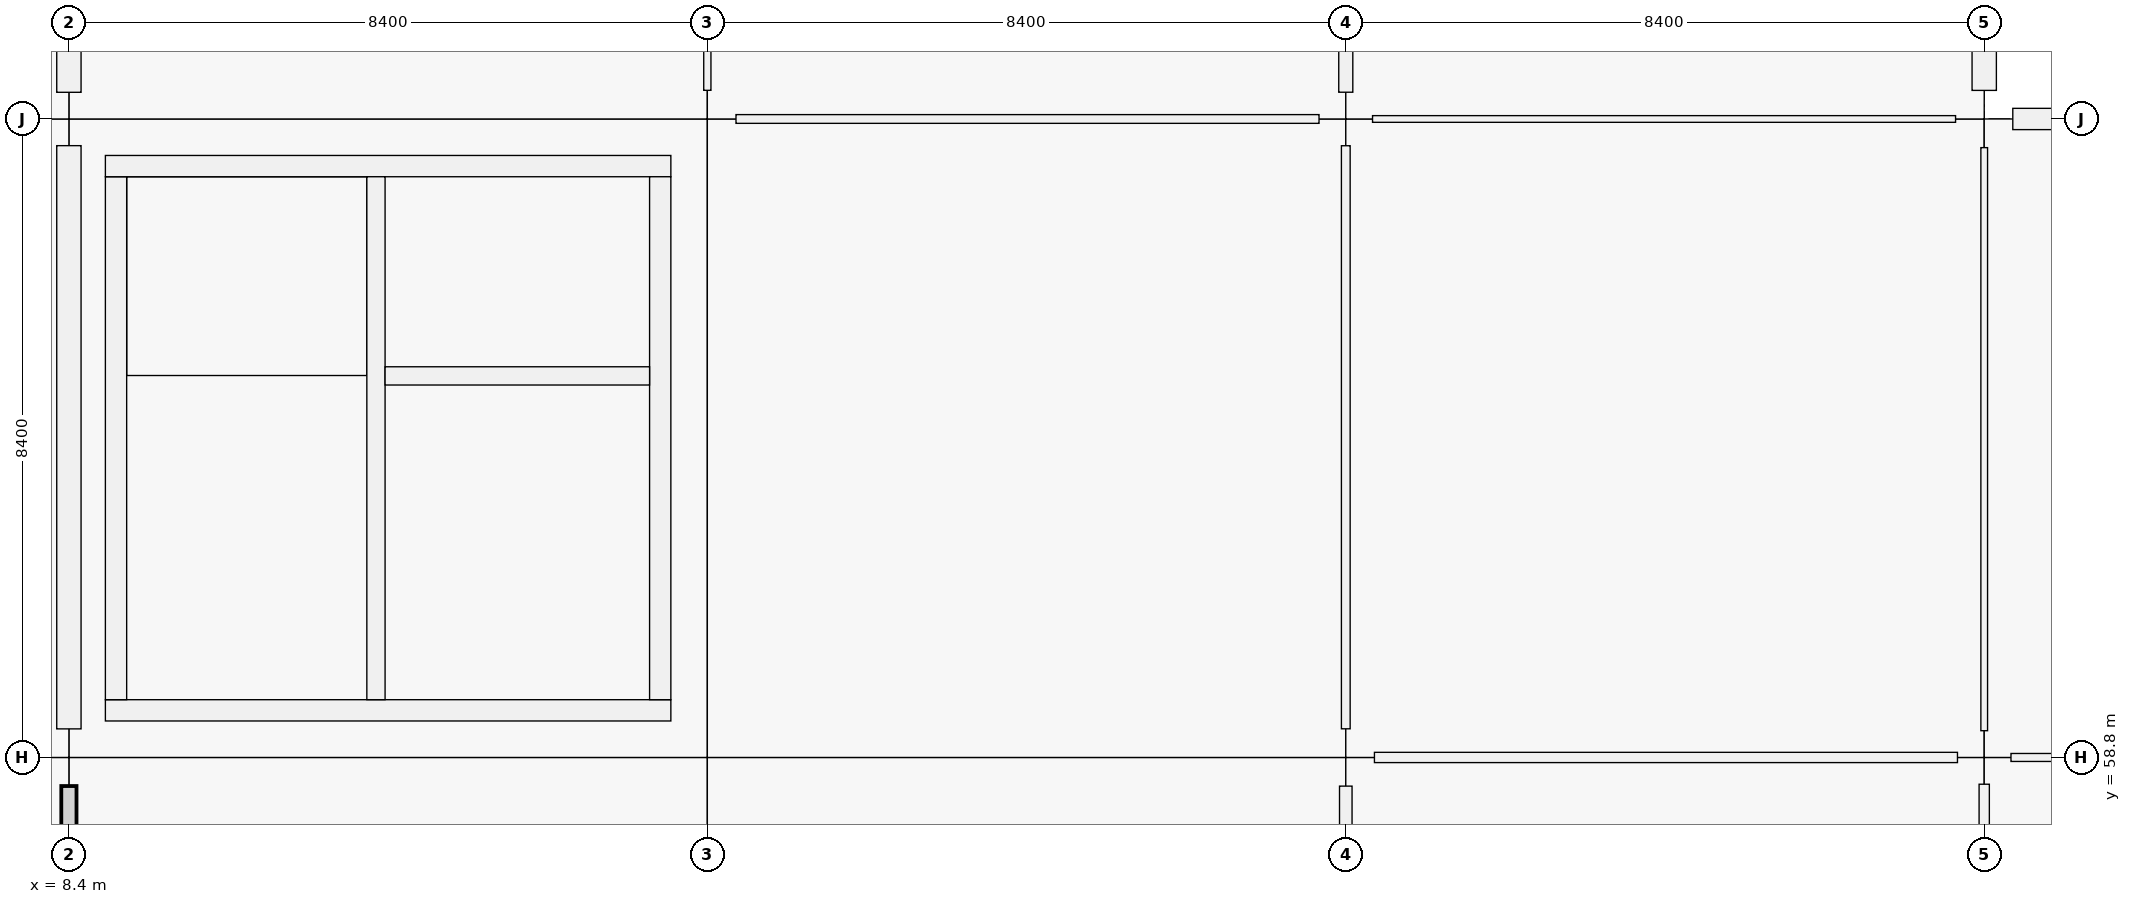
"""IFC4 building model, lengths in metres.
Left out: names, types, materials, properties, quantities, classifications, styles, units other than length and angle.
Written with IfcOpenShell. Run it as: python <this file> out.ifc"""

import sys

from ifc_helpers import new_model, si_unit, direction, frame, frame_2d, origin, origin_2d, place, context, subcontext, project, spatial, rectangle, extrude, element, fill, save


model = new_model("IFC4")
c1 = context("Model", 3, precision=1e-05, world=origin(), true_north=direction((0.0, 1.0)))
c2 = subcontext(c1, "Body", "Model", "MODEL_VIEW")
j1 = project(units=[si_unit("LENGTHUNIT", "METRE"), si_unit("PLANEANGLEUNIT", "RADIAN")], contexts=[c1])
p1 = place(None, origin())
s1 = spatial("IfcSite", under=j1, at=p1, CompositionType="ELEMENT")
p2 = place(p1, origin())
s2 = spatial("IfcBuilding", under=s1, at=p2, CompositionType="ELEMENT")
p3 = place(p2, frame((0.0, 0.0, 10.26)))
s3 = spatial("IfcBuildingStorey", under=s2, at=p3, CompositionType="ELEMENT", Elevation=10.26)
p4 = place(p3, frame((8.4, 58.8, 0.0), z_axis=(0.0, 0.0, 1.0), x_axis=(1.0, 0.0, 0.0)))
e1 = element("IfcColumn", 1, at=p4, inside=s3, PredefinedType="COLUMN", context=c2, shape_type="SweptSolid", body=[
    extrude(rectangle(XDim=0.75, YDim=0.75, at=origin_2d()), origin(), (0.0, 0.0, 1.0), 4.5),
])
for number, where, z_axis, x_axis in (
    (2, (8.4, 67.2, 0.0), (0.0, 0.0, 1.0), (1.0, 0.0, 0.0)),
    (3, (16.8, 58.8, 0.0), (0.0, 0.0, 1.0), (1.0, 0.0, 0.0)),
):
    element("IfcColumn", number, at=place(p3, frame(where, z_axis=z_axis, x_axis=x_axis)), inside=s3, PredefinedType="COLUMN", context=c2, shape_type="SweptSolid", body=[
        extrude(rectangle(XDim=0.7, YDim=0.7, at=origin_2d()), origin(), (0.0, 0.0, 1.0), 4.5),
    ])
for number, where, z_axis, x_axis in (
    (4, (16.8, 67.2, 0.0), (0.0, 0.0, 1.0), (1.0, 0.0, 0.0)),
    (5, (25.2, 58.8, 0.0), (0.0, 0.0, 1.0), (1.0, 0.0, 0.0)),
):
    element("IfcColumn", number, at=place(p3, frame(where, z_axis=z_axis, x_axis=x_axis)), inside=s3, PredefinedType="COLUMN", context=c2, shape_type="SweptSolid", body=[
        extrude(rectangle(XDim=0.75, YDim=0.75, at=origin_2d()), origin(), (0.0, 0.0, 1.0), 4.5),
    ])
for number, where, z_axis, x_axis in (
    (6, (25.2, 67.2, 0.0), (0.0, 0.0, 1.0), (1.0, 0.0, 0.0)),
    (7, (33.6, 58.8, 0.0), (0.0, 0.0, 1.0), (1.0, 0.0, 0.0)),
):
    element("IfcColumn", number, at=place(p3, frame(where, z_axis=z_axis, x_axis=x_axis)), inside=s3, PredefinedType="COLUMN", context=c2, shape_type="SweptSolid", body=[
        extrude(rectangle(XDim=0.7, YDim=0.7, at=origin_2d()), origin(), (0.0, 0.0, 1.0), 4.5),
    ])
p5 = place(p3, frame((33.6, 67.2, 0.0), z_axis=(0.0, 0.0, 1.0), x_axis=(1.0, 0.0, 0.0)))
e8 = element("IfcColumn", 8, at=p5, inside=s3, PredefinedType="COLUMN", context=c2, shape_type="SweptSolid", body=[
    extrude(rectangle(XDim=0.75, YDim=0.75, at=origin_2d()), origin(), (0.0, 0.0, 1.0), 4.5),
])
p6 = place(p3, frame((8.4, 59.176, 0.0), z_axis=(0.0, 0.0, 1.0), x_axis=(0.0, 1.0, 0.0)))
e9 = element("IfcWall", 9, at=p6, inside=s3, PredefinedType="SOLIDWALL", context=c2, shape_type="SweptSolid", body=[
    extrude(rectangle(XDim=7.673, YDim=0.32, at=frame_2d((3.836, 0.0))), origin(), (0.0, 0.0, 1.0), 3.54),
])
p7 = place(p3, frame((8.4, 67.551, 0.0), z_axis=(0.0, 0.0, 1.0), x_axis=(0.0, 1.0, 0.0)))
e10 = element("IfcWall", 10, at=p7, inside=s3, PredefinedType="SOLIDWALL", context=c2, shape_type="SweptSolid", body=[
    extrude(rectangle(XDim=7.673, YDim=0.32, at=frame_2d((3.836, 0.0))), origin(), (0.0, 0.0, 1.0), 3.54),
])
p8 = place(p7, frame((2.787, 0.0, 0.9)))
e11 = element("IfcOpeningElement", 11, at=p8, cuts=e10, PredefinedType="OPENING", context=c2, shape_type="SweptSolid", body=[
    extrude(rectangle(XDim=2.1, YDim=1.8, at=frame_2d((1.05, 0.9))), frame((0.0, 0.16, 0.0), z_axis=(0.0, -1.0, 0.0), x_axis=(1.0, 0.0, 0.0)), (0.0, 0.0, 1.0), 0.32),
])
p9 = place(p3, frame((33.6, 75.249, 0.0), z_axis=(0.0, 0.0, 1.0), x_axis=(0.0, -1.0, 0.0)))
e12 = element("IfcWall", 12, at=p9, inside=s3, PredefinedType="SOLIDWALL", context=c2, shape_type="SweptSolid", body=[
    extrude(rectangle(XDim=7.673, YDim=0.32, at=frame_2d((3.836, 0.0))), origin(), (0.0, 0.0, 1.0), 3.54),
])
p10 = place(p9, frame((2.486, 0.0, 0.9)))
e13 = element("IfcOpeningElement", 13, at=p10, cuts=e12, PredefinedType="OPENING", context=c2, shape_type="SweptSolid", body=[
    extrude(rectangle(XDim=2.7, YDim=1.2, at=frame_2d((1.35, 0.6))), frame((0.0, 0.16, 0.0), z_axis=(0.0, -1.0, 0.0), x_axis=(1.0, 0.0, 0.0)), (0.0, 0.0, 1.0), 0.32),
])
p11 = place(p3, frame((33.976, 67.2, 0.0), z_axis=(0.0, 0.0, 1.0), x_axis=(1.0, 0.0, 0.0)))
e14 = element("IfcWall", 14, at=p11, inside=s3, PredefinedType="SOLIDWALL", context=c2, shape_type="SweptSolid", body=[
    extrude(rectangle(XDim=7.673, YDim=0.28, at=frame_2d((3.836, 0.0))), origin(), (0.0, 0.0, 1.0), 3.54),
])
p12 = place(p11, frame((2.937, 0.0, 0.9)))
e15 = element("IfcOpeningElement", 15, at=p12, cuts=e14, PredefinedType="OPENING", context=c2, shape_type="SweptSolid", body=[
    extrude(rectangle(XDim=1.8, YDim=1.35, at=frame_2d((0.9, 0.675))), frame((0.0, 0.14, 0.0), z_axis=(0.0, -1.0, 0.0), x_axis=(1.0, 0.0, 0.0)), (0.0, 0.0, 1.0), 0.28),
])
p13 = place(p3, frame((16.32, 59.42, 0.0), z_axis=(0.0, 0.0, 1.0), x_axis=(-1.0, 0.0, 0.0)))
e16 = element("IfcWall", 16, at=p13, inside=s3, PredefinedType="SHEAR", context=c2, shape_type="SweptSolid", body=[
    extrude(rectangle(XDim=7.44, YDim=0.28, at=frame_2d((3.72, 0.0))), origin(), (0.0, 0.0, 1.0), 4.5),
])
p14 = place(p13, frame((1.28, 0.0, 0.0)))
e17 = element("IfcOpeningElement", 17, at=p14, cuts=e16, PredefinedType="OPENING", context=c2, shape_type="SweptSolid", body=[
    extrude(rectangle(XDim=1.5, YDim=2.15, at=frame_2d((0.75, 1.075))), frame((0.0, 0.14, 0.0), z_axis=(0.0, -1.0, 0.0), x_axis=(1.0, 0.0, 0.0)), (0.0, 0.0, 1.0), 0.28),
])
p15 = place(p3, frame((9.02, 59.56, 0.0), z_axis=(0.0, 0.0, 1.0), x_axis=(0.0, 1.0, 0.0)))
e18 = element("IfcWall", 18, at=p15, inside=s3, PredefinedType="SHEAR", context=c2, shape_type="SweptSolid", body=[
    extrude(rectangle(XDim=6.88, YDim=0.28, at=frame_2d((3.44, 0.0))), origin(), (0.0, 0.0, 1.0), 4.5),
])
p16 = place(p3, frame((8.88, 66.58, 0.0), z_axis=(0.0, 0.0, 1.0), x_axis=(1.0, 0.0, 0.0)))
e19 = element("IfcWall", 19, at=p16, inside=s3, PredefinedType="SHEAR", context=c2, shape_type="SweptSolid", body=[
    extrude(rectangle(XDim=7.44, YDim=0.28, at=frame_2d((3.72, 0.0))), origin(), (0.0, 0.0, 1.0), 4.5),
])
p17 = place(p3, frame((16.18, 66.44, 0.0), z_axis=(0.0, 0.0, 1.0), x_axis=(0.0, -1.0, 0.0)))
e20 = element("IfcWall", 20, at=p17, inside=s3, PredefinedType="SHEAR", context=c2, shape_type="SweptSolid", body=[
    extrude(rectangle(XDim=6.88, YDim=0.28, at=frame_2d((3.44, 0.0))), origin(), (0.0, 0.0, 1.0), 4.5),
])
p18 = place(p3, frame((12.44, 59.56, 0.0), z_axis=(0.0, 0.0, 1.0), x_axis=(0.0, 1.0, 0.0)))
e21 = element("IfcWall", 21, at=p18, inside=s3, PredefinedType="SHEAR", context=c2, shape_type="SweptSolid", body=[
    extrude(rectangle(XDim=6.88, YDim=0.24, at=frame_2d((3.44, 0.0))), origin(), (0.0, 0.0, 1.0), 4.5),
])
p19 = place(p18, frame((0.12, 0.0, 0.0)))
e22 = element("IfcOpeningElement", 22, at=p19, cuts=e21, PredefinedType="OPENING", context=c2, shape_type="SweptSolid", body=[
    extrude(rectangle(XDim=1.0, YDim=2.15, at=frame_2d((0.5, 1.075))), frame((0.0, 0.12, 0.0), z_axis=(0.0, -1.0, 0.0), x_axis=(1.0, 0.0, 0.0)), (0.0, 0.0, 1.0), 0.24),
])
p20 = place(p3, frame((12.56, 63.82, 0.0), z_axis=(0.0, 0.0, 1.0), x_axis=(1.0, 0.0, 0.0)))
e23 = element("IfcWall", 23, at=p20, inside=s3, PredefinedType="SHEAR", context=c2, shape_type="SweptSolid", body=[
    extrude(rectangle(XDim=3.48, YDim=0.24, at=frame_2d((1.74, 0.0))), origin(), (0.0, 0.0, 1.0), 4.5),
])
p21 = place(p20, frame((1.19, 0.0, 0.0)))
e24 = element("IfcOpeningElement", 24, at=p21, cuts=e23, PredefinedType="OPENING", context=c2, shape_type="SweptSolid", body=[
    extrude(rectangle(XDim=1.1, YDim=2.15, at=frame_2d((0.55, 1.075))), frame((0.0, 0.12, 0.0), z_axis=(0.0, -1.0, 0.0), x_axis=(1.0, 0.0, 0.0)), (0.0, 0.0, 1.0), 0.24),
])
p22 = place(p3, frame((17.177, 67.2, 0.0), z_axis=(0.0, 0.0, 1.0), x_axis=(1.0, 0.0, 0.0)))
e25 = element("IfcWall", 25, at=p22, inside=s3, PredefinedType="PARTITIONING", context=c2, shape_type="SweptSolid", body=[
    extrude(rectangle(XDim=7.671, YDim=0.115, at=frame_2d((3.835, 0.0))), origin(), (0.0, 0.0, 1.0), 3.37),
])
p23 = place(p22, frame((3.316, 0.0, 0.0)))
e26 = element("IfcOpeningElement", 26, at=p23, cuts=e25, PredefinedType="OPENING", context=c2, shape_type="SweptSolid", body=[
    extrude(rectangle(XDim=1.04, YDim=2.2, at=frame_2d((0.52, 1.1))), frame((0.0, 0.058, 0.0), z_axis=(0.0, -1.0, 0.0), x_axis=(1.0, 0.0, 0.0)), (0.0, 0.0, 1.0), 0.115),
])
p24 = place(p3, frame((25.577, 58.8, 0.0), z_axis=(0.0, 0.0, 1.0), x_axis=(1.0, 0.0, 0.0)))
e27 = element("IfcWall", 27, at=p24, inside=s3, PredefinedType="PARTITIONING", context=c2, shape_type="SweptSolid", body=[
    extrude(rectangle(XDim=7.671, YDim=0.135, at=frame_2d((3.835, 0.0))), origin(), (0.0, 0.0, 1.0), 3.37),
])
p25 = place(p24, frame((3.306, 0.0, 0.0)))
e28 = element("IfcOpeningElement", 28, at=p25, cuts=e27, PredefinedType="OPENING", context=c2, shape_type="SweptSolid", body=[
    extrude(rectangle(XDim=1.06, YDim=2.25, at=frame_2d((0.53, 1.125))), frame((0.0, 0.067, 0.0), z_axis=(0.0, -1.0, 0.0), x_axis=(1.0, 0.0, 0.0)), (0.0, 0.0, 1.0), 0.135),
])
p26 = place(p3, frame((25.552, 67.2, 0.0), z_axis=(0.0, 0.0, 1.0), x_axis=(1.0, 0.0, 0.0)))
e29 = element("IfcWall", 29, at=p26, inside=s3, PredefinedType="PARTITIONING", context=c2, shape_type="SweptSolid", body=[
    extrude(rectangle(XDim=7.671, YDim=0.088, at=frame_2d((3.835, 0.0))), origin(), (0.0, 0.0, 1.0), 3.37),
])
p27 = place(p26, frame((3.316, 0.0, 0.0)))
e30 = element("IfcOpeningElement", 30, at=p27, cuts=e29, PredefinedType="OPENING", context=c2, shape_type="SweptSolid", body=[
    extrude(rectangle(XDim=1.04, YDim=2.2, at=frame_2d((0.52, 1.1))), frame((0.0, 0.044, 0.0), z_axis=(0.0, -1.0, 0.0), x_axis=(1.0, 0.0, 0.0)), (0.0, 0.0, 1.0), 0.088),
])
p28 = place(p3, frame((33.952, 58.8, 0.0), z_axis=(0.0, 0.0, 1.0), x_axis=(1.0, 0.0, 0.0)))
e31 = element("IfcWall", 31, at=p28, inside=s3, PredefinedType="PARTITIONING", context=c2, shape_type="SweptSolid", body=[
    extrude(rectangle(XDim=7.721, YDim=0.105, at=frame_2d((3.861, 0.0))), origin(), (0.0, 0.0, 1.0), 3.37),
])
p29 = place(p28, frame((3.351, 0.0, 0.0)))
e32 = element("IfcOpeningElement", 32, at=p29, cuts=e31, PredefinedType="OPENING", context=c2, shape_type="SweptSolid", body=[
    extrude(rectangle(XDim=1.02, YDim=2.2, at=frame_2d((0.51, 1.1))), frame((0.0, 0.052, 0.0), z_axis=(0.0, -1.0, 0.0), x_axis=(1.0, 0.0, 0.0)), (0.0, 0.0, 1.0), 0.105),
])
p30 = place(p3, frame((16.8, 67.577, 0.0), z_axis=(0.0, 0.0, 1.0), x_axis=(0.0, 1.0, 0.0)))
e33 = element("IfcWall", 33, at=p30, inside=s3, PredefinedType="PARTITIONING", context=c2, shape_type="SweptSolid", body=[
    extrude(rectangle(XDim=7.671, YDim=0.095, at=frame_2d((3.835, 0.0))), origin(), (0.0, 0.0, 1.0), 3.37),
])
p31 = place(p30, frame((3.311, 0.0, 0.0)))
e34 = element("IfcOpeningElement", 34, at=p31, cuts=e33, PredefinedType="OPENING", context=c2, shape_type="SweptSolid", body=[
    extrude(rectangle(XDim=1.05, YDim=2.12, at=frame_2d((0.525, 1.06))), frame((0.0, 0.047, 0.0), z_axis=(0.0, -1.0, 0.0), x_axis=(1.0, 0.0, 0.0)), (0.0, 0.0, 1.0), 0.095),
])
p32 = place(p3, frame((25.2, 50.752, 0.0), z_axis=(0.0, 0.0, 1.0), x_axis=(0.0, 1.0, 0.0)))
e35 = element("IfcWall", 35, at=p32, inside=s3, PredefinedType="PARTITIONING", context=c2, shape_type="SweptSolid", body=[
    extrude(rectangle(XDim=7.671, YDim=0.165, at=frame_2d((3.835, 0.0))), origin(), (0.0, 0.0, 1.0), 3.37),
])
p33 = place(p32, frame((3.306, 0.0, 0.0)))
e36 = element("IfcOpeningElement", 36, at=p33, cuts=e35, PredefinedType="OPENING", context=c2, shape_type="SweptSolid", body=[
    extrude(rectangle(XDim=1.06, YDim=2.25, at=frame_2d((0.53, 1.125))), frame((0.0, 0.083, 0.0), z_axis=(0.0, -1.0, 0.0), x_axis=(1.0, 0.0, 0.0)), (0.0, 0.0, 1.0), 0.165),
])
p34 = place(p3, frame((25.2, 59.177, 0.0), z_axis=(0.0, 0.0, 1.0), x_axis=(0.0, 1.0, 0.0)))
e37 = element("IfcWall", 37, at=p34, inside=s3, PredefinedType="PARTITIONING", context=c2, shape_type="SweptSolid", body=[
    extrude(rectangle(XDim=7.671, YDim=0.115, at=frame_2d((3.835, 0.0))), origin(), (0.0, 0.0, 1.0), 3.37),
])
p35 = place(p34, frame((3.316, 0.0, 0.0)))
e38 = element("IfcOpeningElement", 38, at=p35, cuts=e37, PredefinedType="OPENING", context=c2, shape_type="SweptSolid", body=[
    extrude(rectangle(XDim=1.04, YDim=2.2, at=frame_2d((0.52, 1.1))), frame((0.0, 0.058, 0.0), z_axis=(0.0, -1.0, 0.0), x_axis=(1.0, 0.0, 0.0)), (0.0, 0.0, 1.0), 0.115),
])
p36 = place(p3, frame((25.2, 67.552, 0.0), z_axis=(0.0, 0.0, 1.0), x_axis=(0.0, 1.0, 0.0)))
e39 = element("IfcWall", 39, at=p36, inside=s3, PredefinedType="PARTITIONING", context=c2, shape_type="SweptSolid", body=[
    extrude(rectangle(XDim=7.671, YDim=0.185, at=frame_2d((3.835, 0.0))), origin(), (0.0, 0.0, 1.0), 3.37),
])
p37 = place(p36, frame((3.356, 0.0, 0.0)))
e40 = element("IfcOpeningElement", 40, at=p37, cuts=e39, PredefinedType="OPENING", context=c2, shape_type="SweptSolid", body=[
    extrude(rectangle(XDim=0.96, YDim=2.18, at=frame_2d((0.48, 1.09))), frame((0.0, 0.093, 0.0), z_axis=(0.0, -1.0, 0.0), x_axis=(1.0, 0.0, 0.0)), (0.0, 0.0, 1.0), 0.185),
])
p38 = place(p3, frame((33.6, 50.777, 0.0), z_axis=(0.0, 0.0, 1.0), x_axis=(0.0, 1.0, 0.0)))
e41 = element("IfcWall", 41, at=p38, inside=s3, PredefinedType="PARTITIONING", context=c2, shape_type="SweptSolid", body=[
    extrude(rectangle(XDim=7.671, YDim=0.135, at=frame_2d((3.835, 0.0))), origin(), (0.0, 0.0, 1.0), 3.37),
])
p39 = place(p38, frame((3.336, 0.0, 0.0)))
e42 = element("IfcOpeningElement", 42, at=p39, cuts=e41, PredefinedType="OPENING", context=c2, shape_type="SweptSolid", body=[
    extrude(rectangle(XDim=1.0, YDim=2.2, at=frame_2d((0.5, 1.1))), frame((0.0, 0.067, 0.0), z_axis=(0.0, -1.0, 0.0), x_axis=(1.0, 0.0, 0.0)), (0.0, 0.0, 1.0), 0.135),
])
p40 = place(p3, frame((33.6, 59.152, 0.0), z_axis=(0.0, 0.0, 1.0), x_axis=(0.0, 1.0, 0.0)))
e43 = element("IfcWall", 43, at=p40, inside=s3, PredefinedType="PARTITIONING", context=c2, shape_type="SweptSolid", body=[
    extrude(rectangle(XDim=7.671, YDim=0.088, at=frame_2d((3.835, 0.0))), origin(), (0.0, 0.0, 1.0), 3.37),
])
p41 = place(p40, frame((3.365, 0.0, 0.0)))
e44 = element("IfcOpeningElement", 44, at=p41, cuts=e43, PredefinedType="OPENING", context=c2, shape_type="SweptSolid", body=[
    extrude(rectangle(XDim=0.94, YDim=2.15, at=frame_2d((0.47, 1.075))), frame((0.0, 0.044, 0.0), z_axis=(0.0, -1.0, 0.0), x_axis=(1.0, 0.0, 0.0)), (0.0, 0.0, 1.0), 0.088),
])
p42 = place(p19, origin())
e45 = element("IfcDoor", 45, at=p42, inside=s3, OperationType="SINGLE_SWING_LEFT", PredefinedType="DOOR", context=c2, shape_type="SweptSolid", body=[
    extrude(rectangle(XDim=1.0, YDim=2.15, at=frame_2d((0.5, 1.075))), frame((0.0, 0.025, 0.0), z_axis=(0.0, -1.0, 0.0), x_axis=(1.0, 0.0, 0.0)), (0.0, 0.0, 1.0), 0.05),
])
fill(e22, e45)
p43 = place(p14, origin())
e46 = element("IfcDoor", 46, at=p43, inside=s3, OperationType="DOUBLE_DOOR_SINGLE_SWING", PredefinedType="DOOR", context=c2, shape_type="SweptSolid", body=[
    extrude(rectangle(XDim=1.5, YDim=2.15, at=frame_2d((0.75, 1.075))), frame((0.0, 0.025, 0.0), z_axis=(0.0, -1.0, 0.0), x_axis=(1.0, 0.0, 0.0)), (0.0, 0.0, 1.0), 0.05),
])
fill(e17, e46)
p44 = place(p21, origin())
e47 = element("IfcDoor", 47, at=p44, inside=s3, OperationType="DOUBLE_DOOR_SLIDING", PredefinedType="DOOR", context=c2, shape_type="SweptSolid", body=[
    extrude(rectangle(XDim=1.1, YDim=2.15, at=frame_2d((0.55, 1.075))), frame((0.0, 0.025, 0.0), z_axis=(0.0, -1.0, 0.0), x_axis=(1.0, 0.0, 0.0)), (0.0, 0.0, 1.0), 0.05),
])
fill(e24, e47)
p45 = place(p23, origin())
e48 = element("IfcDoor", 48, at=p45, inside=s3, OperationType="SINGLE_SWING_LEFT", PredefinedType="DOOR", context=c2, shape_type="SweptSolid", body=[
    extrude(rectangle(XDim=1.04, YDim=2.2, at=frame_2d((0.52, 1.1))), frame((0.0, 0.025, 0.0), z_axis=(0.0, -1.0, 0.0), x_axis=(1.0, 0.0, 0.0)), (0.0, 0.0, 1.0), 0.05),
])
fill(e26, e48)
p46 = place(p35, origin())
e49 = element("IfcDoor", 49, at=p46, inside=s3, OperationType="SINGLE_SWING_RIGHT", PredefinedType="DOOR", context=c2, shape_type="SweptSolid", body=[
    extrude(rectangle(XDim=1.04, YDim=2.2, at=frame_2d((0.52, 1.1))), frame((0.0, 0.025, 0.0), z_axis=(0.0, -1.0, 0.0), x_axis=(1.0, 0.0, 0.0)), (0.0, 0.0, 1.0), 0.05),
])
fill(e38, e49)
p47 = place(p27, origin())
e50 = element("IfcDoor", 50, at=p47, inside=s3, OperationType="SINGLE_SWING_RIGHT", PredefinedType="DOOR", context=c2, shape_type="SweptSolid", body=[
    extrude(rectangle(XDim=1.04, YDim=2.2, at=frame_2d((0.52, 1.1))), frame((0.0, 0.025, 0.0), z_axis=(0.0, -1.0, 0.0), x_axis=(1.0, 0.0, 0.0)), (0.0, 0.0, 1.0), 0.05),
])
fill(e30, e50)
p48 = place(p25, origin())
e51 = element("IfcDoor", 51, at=p48, inside=s3, OperationType="SINGLE_SWING_LEFT", PredefinedType="DOOR", context=c2, shape_type="SweptSolid", body=[
    extrude(rectangle(XDim=1.06, YDim=2.25, at=frame_2d((0.53, 1.125))), frame((0.0, 0.025, 0.0), z_axis=(0.0, -1.0, 0.0), x_axis=(1.0, 0.0, 0.0)), (0.0, 0.0, 1.0), 0.05),
])
fill(e28, e51)
p49 = place(p41, origin())
e52 = element("IfcDoor", 52, at=p49, inside=s3, OperationType="SINGLE_SWING_LEFT", PredefinedType="DOOR", context=c2, shape_type="SweptSolid", body=[
    extrude(rectangle(XDim=0.94, YDim=2.15, at=frame_2d((0.47, 1.075))), frame((0.0, 0.025, 0.0), z_axis=(0.0, -1.0, 0.0), x_axis=(1.0, 0.0, 0.0)), (0.0, 0.0, 1.0), 0.05),
])
fill(e44, e52)
save(model, sys.argv[1])
